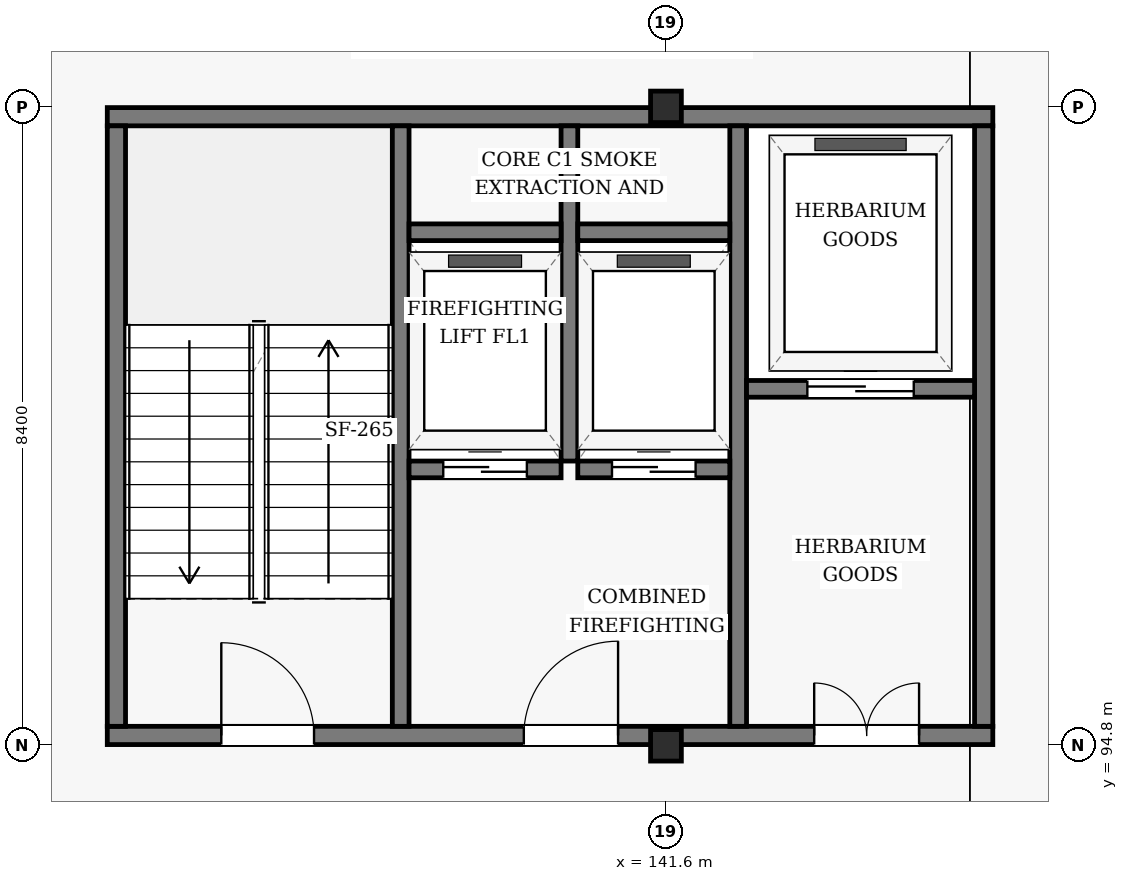
"""IFC4 building model, lengths in metres.
Left out: names, types, materials, properties, quantities, classifications, styles, units other than length and angle.
Written with IfcOpenShell. Run it as: python <this file> out.ifc"""

import sys

from ifc_helpers import new_model, si_unit, direction, frame, frame_2d, origin, origin_2d, place, context, subcontext, project, spatial, rectangle, i_section, extrude, element, fill, save


model = new_model("IFC4")
c1 = context("Model", 3, precision=1e-05, world=origin(), true_north=direction((0.0, 1.0)))
c2 = subcontext(c1, "Body", "Model", "MODEL_VIEW")
j1 = project(units=[si_unit("LENGTHUNIT", "METRE"), si_unit("PLANEANGLEUNIT", "RADIAN")], contexts=[c1])
p1 = place(None, origin())
s1 = spatial("IfcSite", under=j1, at=p1, CompositionType="ELEMENT")
p2 = place(p1, origin())
s2 = spatial("IfcBuilding", under=s1, at=p2, CompositionType="ELEMENT")
p3 = place(p2, frame((0.0, 0.0, 13.2)))
s3 = spatial("IfcBuildingStorey", under=s2, at=p3, CompositionType="ELEMENT", Elevation=13.2)
for number, where, z_axis, x_axis in (
    (1, (141.6, 94.8, 0.0), (0.0, 0.0, 1.0), (1.0, 0.0, 0.0)),
    (2, (141.6, 103.2, 0.0), (0.0, 0.0, 1.0), (1.0, 0.0, 0.0)),
):
    element("IfcColumn", number, at=place(p3, frame(where, z_axis=z_axis, x_axis=x_axis)), inside=s3, PredefinedType="COLUMN", context=c2, shape_type="SweptSolid", body=[
        extrude(i_section(OverallWidth=0.405, OverallDepth=0.414, WebThickness=0.018, FlangeThickness=0.028, FilletRadius=0.022, at=origin_2d()), origin(), (0.0, 0.0, 1.0), 3.9),
    ])
p4 = place(p3, frame((134.25, 94.93, 0.0), z_axis=(0.0, 0.0, 1.0), x_axis=(1.0, 0.0, 0.0)))
e3 = element("IfcWall", 3, at=p4, inside=s3, PredefinedType="SHEAR", context=c2, shape_type="SweptSolid", body=[
    extrude(rectangle(XDim=11.65, YDim=0.24, at=frame_2d((5.825, 0.0))), origin(), (0.0, 0.0, 1.0), 3.62),
])
p5 = place(p4, frame((1.5, 0.0, 0.0)))
e4 = element("IfcOpeningElement", 4, at=p5, cuts=e3, PredefinedType="OPENING", context=c2, shape_type="SweptSolid", body=[
    extrude(rectangle(XDim=1.22, YDim=2.18, at=frame_2d((0.61, 1.09))), frame((0.0, 0.13, 0.0), z_axis=(0.0, -1.0, 0.0), x_axis=(1.0, 0.0, 0.0)), (0.0, 0.0, 1.0), 0.26),
])
p6 = place(p4, frame((5.48, 0.0, 0.0)))
e5 = element("IfcOpeningElement", 5, at=p6, cuts=e3, PredefinedType="OPENING", context=c2, shape_type="SweptSolid", body=[
    extrude(rectangle(XDim=1.24, YDim=2.15, at=frame_2d((0.62, 1.075))), frame((0.0, 0.13, 0.0), z_axis=(0.0, -1.0, 0.0), x_axis=(1.0, 0.0, 0.0)), (0.0, 0.0, 1.0), 0.26),
])
p7 = place(p4, frame((9.3, 0.0, 0.0)))
e6 = element("IfcOpeningElement", 6, at=p7, cuts=e3, PredefinedType="OPENING", context=c2, shape_type="SweptSolid", body=[
    extrude(rectangle(XDim=1.38, YDim=2.15, at=frame_2d((0.69, 1.075))), frame((0.0, 0.13, 0.0), z_axis=(0.0, -1.0, 0.0), x_axis=(1.0, 0.0, 0.0)), (0.0, 0.0, 1.0), 0.26),
])
p8 = place(p3, frame((134.25, 103.07, 0.0), z_axis=(0.0, 0.0, 1.0), x_axis=(1.0, 0.0, 0.0)))
e7 = element("IfcWall", 7, at=p8, inside=s3, PredefinedType="SHEAR", context=c2, shape_type="SweptSolid", body=[
    extrude(rectangle(XDim=11.65, YDim=0.24, at=frame_2d((5.825, 0.0))), origin(), (0.0, 0.0, 1.0), 3.62),
])
p9 = place(p3, frame((134.37, 95.05, 0.0), z_axis=(0.0, 0.0, 1.0), x_axis=(0.0, 1.0, 0.0)))
e8 = element("IfcWall", 8, at=p9, inside=s3, PredefinedType="SHEAR", context=c2, shape_type="SweptSolid", body=[
    extrude(rectangle(XDim=7.9, YDim=0.24, at=frame_2d((3.95, 0.0))), origin(), (0.0, 0.0, 1.0), 3.62),
])
p10 = place(p3, frame((138.11, 95.05, 0.0), z_axis=(0.0, 0.0, 1.0), x_axis=(0.0, 1.0, 0.0)))
e9 = element("IfcWall", 9, at=p10, inside=s3, PredefinedType="SHEAR", context=c2, shape_type="SweptSolid", body=[
    extrude(rectangle(XDim=7.9, YDim=0.22, at=frame_2d((3.95, 0.0))), origin(), (0.0, 0.0, 1.0), 3.62),
])
p11 = place(p3, frame((140.33, 98.54, 0.0), z_axis=(0.0, 0.0, 1.0), x_axis=(0.0, 1.0, 0.0)))
e10 = element("IfcWall", 10, at=p11, inside=s3, PredefinedType="SHEAR", context=c2, shape_type="SweptSolid", body=[
    extrude(rectangle(XDim=4.41, YDim=0.22, at=frame_2d((2.205, 0.0))), origin(), (0.0, 0.0, 1.0), 3.62),
])
p12 = place(p3, frame((142.55, 95.05, 0.0), z_axis=(0.0, 0.0, 1.0), x_axis=(0.0, 1.0, 0.0)))
e11 = element("IfcWall", 11, at=p12, inside=s3, PredefinedType="SHEAR", context=c2, shape_type="SweptSolid", body=[
    extrude(rectangle(XDim=7.9, YDim=0.22, at=frame_2d((3.95, 0.0))), origin(), (0.0, 0.0, 1.0), 3.62),
])
p13 = place(p3, frame((145.78, 95.05, 0.0), z_axis=(0.0, 0.0, 1.0), x_axis=(0.0, 1.0, 0.0)))
e12 = element("IfcWall", 12, at=p13, inside=s3, PredefinedType="SHEAR", context=c2, shape_type="SweptSolid", body=[
    extrude(rectangle(XDim=7.9, YDim=0.24, at=frame_2d((3.95, 0.0))), origin(), (0.0, 0.0, 1.0), 3.62),
])
p14 = place(p3, frame((138.22, 98.43, 0.0), z_axis=(0.0, 0.0, 1.0), x_axis=(1.0, 0.0, 0.0)))
e13 = element("IfcWall", 13, at=p14, inside=s3, PredefinedType="SHEAR", context=c2, shape_type="SweptSolid", body=[
    extrude(rectangle(XDim=2.0, YDim=0.22, at=frame_2d((1.0, 0.0))), origin(), (0.0, 0.0, 1.0), 3.62),
])
p15 = place(p14, frame((0.45, 0.0, 0.0)))
e14 = element("IfcOpeningElement", 14, at=p15, cuts=e13, PredefinedType="OPENING", context=c2, shape_type="SweptSolid", body=[
    extrude(rectangle(XDim=1.1, YDim=2.15, at=frame_2d((0.55, 1.075))), frame((0.0, 0.12, 0.0), z_axis=(0.0, -1.0, 0.0), x_axis=(1.0, 0.0, 0.0)), (0.0, 0.0, 1.0), 0.24),
])
p16 = place(p3, frame((140.44, 98.43, 0.0), z_axis=(0.0, 0.0, 1.0), x_axis=(1.0, 0.0, 0.0)))
e15 = element("IfcWall", 15, at=p16, inside=s3, PredefinedType="SHEAR", context=c2, shape_type="SweptSolid", body=[
    extrude(rectangle(XDim=2.0, YDim=0.22, at=frame_2d((1.0, 0.0))), origin(), (0.0, 0.0, 1.0), 3.62),
])
p17 = place(p16, frame((0.45, 0.0, 0.0)))
e16 = element("IfcOpeningElement", 16, at=p17, cuts=e15, PredefinedType="OPENING", context=c2, shape_type="SweptSolid", body=[
    extrude(rectangle(XDim=1.1, YDim=2.15, at=frame_2d((0.55, 1.075))), frame((0.0, 0.12, 0.0), z_axis=(0.0, -1.0, 0.0), x_axis=(1.0, 0.0, 0.0)), (0.0, 0.0, 1.0), 0.24),
])
for number, where, z_axis, x_axis in (
    (17, (138.22, 101.55, 0.0), (0.0, 0.0, 1.0), (1.0, 0.0, 0.0)),
    (18, (140.44, 101.55, 0.0), (0.0, 0.0, 1.0), (1.0, 0.0, 0.0)),
):
    element("IfcWall", number, at=place(p3, frame(where, z_axis=z_axis, x_axis=x_axis)), inside=s3, PredefinedType="SHEAR", context=c2, shape_type="SweptSolid", body=[
        extrude(rectangle(XDim=2.0, YDim=0.22, at=frame_2d((1.0, 0.0))), origin(), (0.0, 0.0, 1.0), 3.62),
    ])
p18 = place(p3, frame((142.66, 99.49, 0.0), z_axis=(0.0, 0.0, 1.0), x_axis=(1.0, 0.0, 0.0)))
e19 = element("IfcWall", 19, at=p18, inside=s3, PredefinedType="SHEAR", context=c2, shape_type="SweptSolid", body=[
    extrude(rectangle(XDim=3.0, YDim=0.22, at=frame_2d((1.5, 0.0))), origin(), (0.0, 0.0, 1.0), 3.62),
])
p19 = place(p18, frame((0.8, 0.0, 0.0)))
e20 = element("IfcOpeningElement", 20, at=p19, cuts=e19, PredefinedType="OPENING", context=c2, shape_type="SweptSolid", body=[
    extrude(rectangle(XDim=1.4, YDim=2.2, at=frame_2d((0.7, 1.1))), frame((0.0, 0.12, 0.0), z_axis=(0.0, -1.0, 0.0), x_axis=(1.0, 0.0, 0.0)), (0.0, 0.0, 1.0), 0.24),
])
p20 = place(p5, origin())
e21 = element("IfcDoor", 21, at=p20, inside=s3, OperationType="SINGLE_SWING_LEFT", PredefinedType="DOOR", context=c2, shape_type="SweptSolid", body=[
    extrude(rectangle(XDim=1.22, YDim=2.18, at=frame_2d((0.61, 1.09))), frame((0.0, 0.025, 0.0), z_axis=(0.0, -1.0, 0.0), x_axis=(1.0, 0.0, 0.0)), (0.0, 0.0, 1.0), 0.05),
])
fill(e4, e21)
p21 = place(p6, frame((1.24, 0.0, 0.0), z_axis=(0.0, 0.0, 1.0), x_axis=(-1.0, 0.0, 0.0)))
e22 = element("IfcDoor", 22, at=p21, inside=s3, OperationType="SINGLE_SWING_RIGHT", PredefinedType="DOOR", context=c2, shape_type="SweptSolid", body=[
    extrude(rectangle(XDim=1.24, YDim=2.15, at=frame_2d((0.62, 1.075))), frame((0.0, 0.025, 0.0), z_axis=(0.0, -1.0, 0.0), x_axis=(1.0, 0.0, 0.0)), (0.0, 0.0, 1.0), 0.05),
])
fill(e5, e22)
p22 = place(p7, frame((1.38, 0.0, 0.0), z_axis=(0.0, 0.0, 1.0), x_axis=(-1.0, 0.0, 0.0)))
e23 = element("IfcDoor", 23, at=p22, inside=s3, OperationType="DOUBLE_DOOR_SINGLE_SWING", PredefinedType="DOOR", context=c2, shape_type="SweptSolid", body=[
    extrude(rectangle(XDim=1.38, YDim=2.15, at=frame_2d((0.69, 1.075))), frame((0.0, 0.025, 0.0), z_axis=(0.0, -1.0, 0.0), x_axis=(1.0, 0.0, 0.0)), (0.0, 0.0, 1.0), 0.05),
])
fill(e6, e23)
p23 = place(p15, origin())
e24 = element("IfcDoor", 24, at=p23, inside=s3, OperationType="SLIDING_TO_LEFT", PredefinedType="DOOR", context=c2, shape_type="SweptSolid", body=[
    extrude(rectangle(XDim=1.1, YDim=2.15, at=frame_2d((0.55, 1.075))), frame((0.0, 0.025, 0.0), z_axis=(0.0, -1.0, 0.0), x_axis=(1.0, 0.0, 0.0)), (0.0, 0.0, 1.0), 0.05),
])
fill(e14, e24)
p24 = place(p17, origin())
e25 = element("IfcDoor", 25, at=p24, inside=s3, OperationType="SLIDING_TO_LEFT", PredefinedType="DOOR", context=c2, shape_type="SweptSolid", body=[
    extrude(rectangle(XDim=1.1, YDim=2.15, at=frame_2d((0.55, 1.075))), frame((0.0, 0.025, 0.0), z_axis=(0.0, -1.0, 0.0), x_axis=(1.0, 0.0, 0.0)), (0.0, 0.0, 1.0), 0.05),
])
fill(e16, e25)
p25 = place(p19, origin())
e26 = element("IfcDoor", 26, at=p25, inside=s3, OperationType="SLIDING_TO_LEFT", PredefinedType="DOOR", context=c2, shape_type="SweptSolid", body=[
    extrude(rectangle(XDim=1.4, YDim=2.2, at=frame_2d((0.7, 1.1))), frame((0.0, 0.025, 0.0), z_axis=(0.0, -1.0, 0.0), x_axis=(1.0, 0.0, 0.0)), (0.0, 0.0, 1.0), 0.05),
])
fill(e20, e26)
save(model, sys.argv[1])
